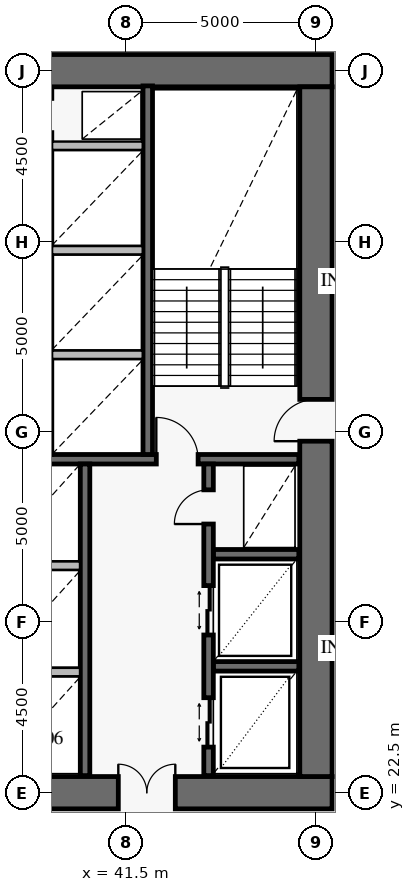
"""IFC4 building model, lengths in metres.
Left out: names, types, materials, properties, quantities, classifications, styles, units other than length and angle.
Written with IfcOpenShell. Run it as: python <this file> out.ifc"""

import sys

from ifc_helpers import new_model, si_unit, direction, frame, frame_2d, origin, place, context, subcontext, project, spatial, rectangle, extrude, element, fill, save


model = new_model("IFC4")
c1 = context("Model", 3, precision=1e-05, world=origin(), true_north=direction((0.0, 1.0)))
c2 = subcontext(c1, "Body", "Model", "MODEL_VIEW")
j1 = project(units=[si_unit("LENGTHUNIT", "METRE"), si_unit("PLANEANGLEUNIT", "RADIAN")], contexts=[c1])
p1 = place(None, origin())
s1 = spatial("IfcSite", under=j1, at=p1, CompositionType="ELEMENT")
p2 = place(p1, origin())
s2 = spatial("IfcBuilding", under=s1, at=p2, CompositionType="ELEMENT")
p3 = place(p2, frame((0.0, 0.0, 37.2)))
s3 = spatial("IfcBuildingStorey", under=s2, at=p3, CompositionType="ELEMENT", Elevation=37.2)
p4 = place(p3, frame((37.35, 22.5, 0.0), z_axis=(0.0, 0.0, 1.0), x_axis=(1.0, 0.0, 0.0)))
e1 = element("IfcWall", 1, at=p4, inside=s3, PredefinedType="SHEAR", context=c2, shape_type="SweptSolid", body=[
    extrude(rectangle(XDim=9.575, YDim=0.85, at=frame_2d((4.788, 0.0))), origin(), (0.0, 0.0, 1.0), 4.2),
])
p5 = place(p4, frame((3.95, 0.0, 0.0)))
e2 = element("IfcOpeningElement", 2, at=p5, cuts=e1, PredefinedType="OPENING", context=c2, shape_type="SweptSolid", body=[
    extrude(rectangle(XDim=1.5, YDim=2.15, at=frame_2d((0.75, 1.075))), frame((0.0, 0.437, 0.0), z_axis=(0.0, -1.0, 0.0), x_axis=(1.0, 0.0, 0.0)), (0.0, 0.0, 1.0), 0.874),
])
p6 = place(p3, frame((46.925, 41.5, 0.0), z_axis=(0.0, 0.0, 1.0), x_axis=(-1.0, 0.0, 0.0)))
e3 = element("IfcWall", 3, at=p6, inside=s3, PredefinedType="SHEAR", context=c2, shape_type="SweptSolid", body=[
    extrude(rectangle(XDim=7.975, YDim=0.85, at=frame_2d((3.988, 0.0))), origin(), (0.0, 0.0, 1.0), 4.2),
])
p7 = place(p3, frame((46.5, 22.925, 0.0), z_axis=(0.0, 0.0, 1.0), x_axis=(0.0, 1.0, 0.0)))
e4 = element("IfcWall", 4, at=p7, inside=s3, PredefinedType="SHEAR", context=c2, shape_type="SweptSolid", body=[
    extrude(rectangle(XDim=18.15, YDim=0.85, at=frame_2d((9.075, 0.0))), origin(), (0.0, 0.0, 1.0), 4.2),
])
p8 = place(p7, frame((8.825, 0.0, 0.0)))
e5 = element("IfcOpeningElement", 5, at=p8, cuts=e4, PredefinedType="OPENING", context=c2, shape_type="SweptSolid", body=[
    extrude(rectangle(XDim=1.1, YDim=2.15, at=frame_2d((0.55, 1.075))), frame((0.0, 0.437, 0.0), z_axis=(0.0, -1.0, 0.0), x_axis=(1.0, 0.0, 0.0)), (0.0, 0.0, 1.0), 0.874),
])
p9 = place(p3, frame((25.95, 31.275, 0.0), z_axis=(0.0, 0.0, 1.0), x_axis=(1.0, 0.0, 0.0)))
e6 = element("IfcWall", 6, at=p9, inside=s3, PredefinedType="SOLIDWALL", context=c2, shape_type="SweptSolid", body=[
    extrude(rectangle(XDim=20.1, YDim=0.25, at=frame_2d((10.05, 0.0))), origin(), (0.0, 0.0, 1.0), 4.2),
])
p10 = place(p9, frame((2.6, 0.0, 0.0)))
e7 = element("IfcOpeningElement", 7, at=p10, cuts=e6, PredefinedType="OPENING", context=c2, shape_type="SweptSolid", body=[
    extrude(rectangle(XDim=1.1, YDim=2.15, at=frame_2d((0.55, 1.075))), frame((0.0, 0.137, 0.0), z_axis=(0.0, -1.0, 0.0), x_axis=(1.0, 0.0, 0.0)), (0.0, 0.0, 1.0), 0.274),
])
p11 = place(p9, frame((10.6, 0.0, 0.0)))
e8 = element("IfcOpeningElement", 8, at=p11, cuts=e6, PredefinedType="OPENING", context=c2, shape_type="SweptSolid", body=[
    extrude(rectangle(XDim=1.1, YDim=2.15, at=frame_2d((0.55, 1.075))), frame((0.0, 0.137, 0.0), z_axis=(0.0, -1.0, 0.0), x_axis=(1.0, 0.0, 0.0)), (0.0, 0.0, 1.0), 0.274),
])
p12 = place(p9, frame((16.35, 0.0, 0.0)))
e9 = element("IfcOpeningElement", 9, at=p12, cuts=e6, PredefinedType="OPENING", context=c2, shape_type="SweptSolid", body=[
    extrude(rectangle(XDim=1.1, YDim=2.15, at=frame_2d((0.55, 1.075))), frame((0.0, 0.137, 0.0), z_axis=(0.0, -1.0, 0.0), x_axis=(1.0, 0.0, 0.0)), (0.0, 0.0, 1.0), 0.274),
])
p13 = place(p3, frame((42.075, 31.4, 0.0), z_axis=(0.0, 0.0, 1.0), x_axis=(0.0, 1.0, 0.0)))
e10 = element("IfcWall", 10, at=p13, inside=s3, PredefinedType="SOLIDWALL", context=c2, shape_type="SweptSolid", body=[
    extrude(rectangle(XDim=9.7, YDim=0.25, at=frame_2d((4.85, 0.0))), origin(), (0.0, 0.0, 1.0), 4.2),
])
p14 = place(p3, frame((40.425, 22.95, 0.0), z_axis=(0.0, 0.0, 1.0), x_axis=(0.0, 1.0, 0.0)))
e11 = element("IfcWall", 11, at=p14, inside=s3, PredefinedType="SOLIDWALL", context=c2, shape_type="SweptSolid", body=[
    extrude(rectangle(XDim=8.2, YDim=0.25, at=frame_2d((4.1, 0.0))), origin(), (0.0, 0.0, 1.0), 4.2),
])
for number, where, z_axis, x_axis in (
    (12, (43.8, 25.825, 0.0), (0.0, 0.0, 1.0), (1.0, 0.0, 0.0)),
    (13, (43.8, 28.775, 0.0), (0.0, 0.0, 1.0), (1.0, 0.0, 0.0)),
):
    element("IfcWall", number, at=place(p3, frame(where, z_axis=z_axis, x_axis=x_axis)), inside=s3, PredefinedType="SOLIDWALL", context=c2, shape_type="SweptSolid", body=[
        extrude(rectangle(XDim=2.25, YDim=0.25, at=frame_2d((1.125, 0.0))), origin(), (0.0, 0.0, 1.0), 4.2),
    ])
p15 = place(p3, frame((43.675, 22.95, 0.0), z_axis=(0.0, 0.0, 1.0), x_axis=(0.0, 1.0, 0.0)))
e14 = element("IfcWall", 14, at=p15, inside=s3, PredefinedType="SOLIDWALL", context=c2, shape_type="SweptSolid", body=[
    extrude(rectangle(XDim=8.2, YDim=0.25, at=frame_2d((4.1, 0.0))), origin(), (0.0, 0.0, 1.0), 4.2),
])
p16 = place(p15, frame((0.75, 0.0, 0.0)))
e15 = element("IfcOpeningElement", 15, at=p16, cuts=e14, PredefinedType="OPENING", context=c2, shape_type="SweptSolid", body=[
    extrude(rectangle(XDim=1.3, YDim=2.3, at=frame_2d((0.65, 1.15))), frame((0.0, 0.137, 0.0), z_axis=(0.0, -1.0, 0.0), x_axis=(1.0, 0.0, 0.0)), (0.0, 0.0, 1.0), 0.274),
])
p17 = place(p15, frame((3.7, 0.0, 0.0)))
e16 = element("IfcOpeningElement", 16, at=p17, cuts=e14, PredefinedType="OPENING", context=c2, shape_type="SweptSolid", body=[
    extrude(rectangle(XDim=1.3, YDim=2.3, at=frame_2d((0.65, 1.15))), frame((0.0, 0.137, 0.0), z_axis=(0.0, -1.0, 0.0), x_axis=(1.0, 0.0, 0.0)), (0.0, 0.0, 1.0), 0.274),
])
p18 = place(p15, frame((6.62, 0.0, 0.0)))
e17 = element("IfcOpeningElement", 17, at=p18, cuts=e14, PredefinedType="OPENING", context=c2, shape_type="SweptSolid", body=[
    extrude(rectangle(XDim=0.9, YDim=2.1, at=frame_2d((0.45, 1.05))), frame((0.0, 0.137, 0.0), z_axis=(0.0, -1.0, 0.0), x_axis=(1.0, 0.0, 0.0)), (0.0, 0.0, 1.0), 0.274),
])
for number, where, z_axis, x_axis in (
    (18, (39.558, 34.025, 0.0), (0.0, 0.0, 1.0), (1.0, 0.0, 0.0)),
    (19, (39.558, 36.775, 0.0), (0.0, 0.0, 1.0), (1.0, 0.0, 0.0)),
    (20, (39.558, 39.525, 0.0), (0.0, 0.0, 1.0), (1.0, 0.0, 0.0)),
):
    element("IfcWall", number, at=place(p3, frame(where, z_axis=z_axis, x_axis=x_axis)), inside=s3, PredefinedType="PARTITIONING", context=c2, shape_type="SweptSolid", body=[
        extrude(rectangle(XDim=2.384, YDim=0.22, at=frame_2d((1.192, 0.0))), origin(), (0.0, 0.0, 1.0), 3.92),
    ])
for number, where, z_axis, x_axis in (
    (21, (38.008, 25.675, 0.0), (0.0, 0.0, 1.0), (1.0, 0.0, 0.0)),
    (22, (38.008, 28.475, 0.0), (0.0, 0.0, 1.0), (1.0, 0.0, 0.0)),
):
    element("IfcWall", number, at=place(p3, frame(where, z_axis=z_axis, x_axis=x_axis)), inside=s3, PredefinedType="PARTITIONING", context=c2, shape_type="SweptSolid", body=[
        extrude(rectangle(XDim=2.284, YDim=0.22, at=frame_2d((1.142, 0.0))), origin(), (0.0, 0.0, 1.0), 3.92),
    ])
p19 = place(p8, origin())
e23 = element("IfcDoor", 23, at=p19, inside=s3, OperationType="SINGLE_SWING_LEFT", PredefinedType="USERDEFINED", context=c2, shape_type="SweptSolid", body=[
    extrude(rectangle(XDim=1.1, YDim=2.15, at=frame_2d((0.55, 1.075))), frame((0.0, 0.025, 0.0), z_axis=(0.0, -1.0, 0.0), x_axis=(1.0, 0.0, 0.0)), (0.0, 0.0, 1.0), 0.05),
])
fill(e5, e23)
p20 = place(p5, origin())
e24 = element("IfcDoor", 24, at=p20, inside=s3, OperationType="DOUBLE_DOOR_SINGLE_SWING", PredefinedType="DOOR", context=c2, shape_type="SweptSolid", body=[
    extrude(rectangle(XDim=1.5, YDim=2.15, at=frame_2d((0.75, 1.075))), frame((0.0, 0.025, 0.0), z_axis=(0.0, -1.0, 0.0), x_axis=(1.0, 0.0, 0.0)), (0.0, 0.0, 1.0), 0.05),
])
fill(e2, e24)
p21 = place(p12, origin())
e25 = element("IfcDoor", 25, at=p21, inside=s3, OperationType="SINGLE_SWING_LEFT", PredefinedType="USERDEFINED", context=c2, shape_type="SweptSolid", body=[
    extrude(rectangle(XDim=1.1, YDim=2.15, at=frame_2d((0.55, 1.075))), frame((0.0, 0.025, 0.0), z_axis=(0.0, -1.0, 0.0), x_axis=(1.0, 0.0, 0.0)), (0.0, 0.0, 1.0), 0.05),
])
fill(e9, e25)
p22 = place(p16, origin())
e26 = element("IfcDoor", 26, at=p22, inside=s3, OperationType="DOUBLE_DOOR_SLIDING", PredefinedType="DOOR", context=c2, shape_type="SweptSolid", body=[
    extrude(rectangle(XDim=1.3, YDim=2.3, at=frame_2d((0.65, 1.15))), frame((0.0, 0.025, 0.0), z_axis=(0.0, -1.0, 0.0), x_axis=(1.0, 0.0, 0.0)), (0.0, 0.0, 1.0), 0.05),
])
fill(e15, e26)
p23 = place(p17, origin())
e27 = element("IfcDoor", 27, at=p23, inside=s3, OperationType="DOUBLE_DOOR_SLIDING", PredefinedType="DOOR", context=c2, shape_type="SweptSolid", body=[
    extrude(rectangle(XDim=1.3, YDim=2.3, at=frame_2d((0.65, 1.15))), frame((0.0, 0.025, 0.0), z_axis=(0.0, -1.0, 0.0), x_axis=(1.0, 0.0, 0.0)), (0.0, 0.0, 1.0), 0.05),
])
fill(e16, e27)
p24 = place(p18, origin())
e28 = element("IfcDoor", 28, at=p24, inside=s3, OperationType="SINGLE_SWING_LEFT", PredefinedType="DOOR", context=c2, shape_type="SweptSolid", body=[
    extrude(rectangle(XDim=0.9, YDim=2.1, at=frame_2d((0.45, 1.05))), frame((0.0, 0.025, 0.0), z_axis=(0.0, -1.0, 0.0), x_axis=(1.0, 0.0, 0.0)), (0.0, 0.0, 1.0), 0.05),
])
fill(e17, e28)
save(model, sys.argv[1])
